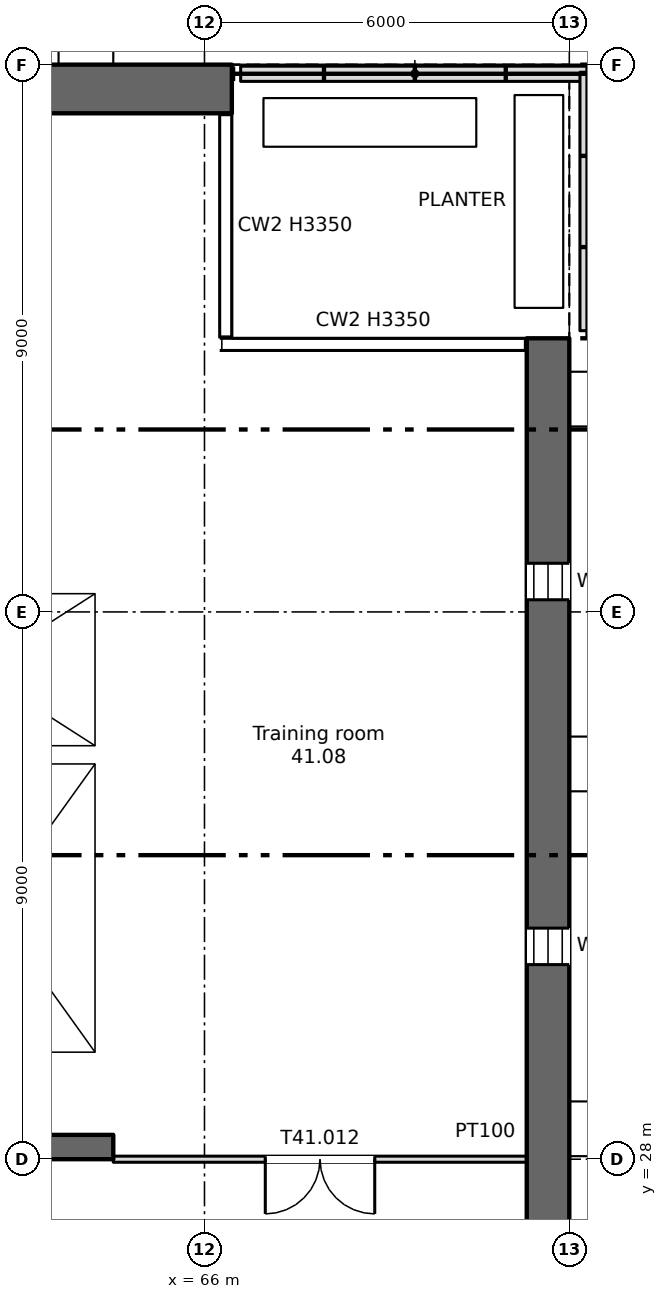
"""IFC4 building model, lengths in metres.
Left out: names, types, materials, properties, quantities, classifications, styles, units other than length and angle.
Written with IfcOpenShell. Run it as: python <this file> out.ifc"""

import sys

from ifc_helpers import new_model, si_unit, direction, frame, frame_2d, origin, place, context, subcontext, project, spatial, rectangle, extrude, element, fill, save


model = new_model("IFC4")
c1 = context("Model", 3, precision=1e-05, world=origin(), true_north=direction((0.0, 1.0)))
c2 = subcontext(c1, "Body", "Model", "MODEL_VIEW")
j1 = project(units=[si_unit("LENGTHUNIT", "METRE"), si_unit("PLANEANGLEUNIT", "RADIAN")], contexts=[c1])
p1 = place(None, origin())
s1 = spatial("IfcSite", under=j1, at=p1, CompositionType="ELEMENT")
p2 = place(p1, origin())
s2 = spatial("IfcBuilding", under=s1, at=p2, CompositionType="ELEMENT")
p3 = place(p2, frame((0.0, 0.0, 95.0)))
s3 = spatial("IfcBuildingStorey", under=s2, at=p3, CompositionType="ELEMENT", Elevation=95.0)
p4 = place(p3, frame((71.65, 6.0, 0.0), z_axis=(0.0, 0.0, 1.0), x_axis=(0.0, 1.0, 0.0)))
e1 = element("IfcWall", 1, at=p4, inside=s3, PredefinedType="SHEAR", context=c2, shape_type="SweptSolid", body=[
    extrude(rectangle(XDim=35.5, YDim=0.7, at=frame_2d((17.75, 0.0))), origin(), (0.0, 0.0, 1.0), 3.35),
])
p5 = place(p4, frame((1.2, 0.0, 0.6)))
e2 = element("IfcOpeningElement", 2, at=p5, cuts=e1, PredefinedType="OPENING", context=c2, shape_type="SweptSolid", body=[
    extrude(rectangle(XDim=0.6, YDim=2.4, at=frame_2d((0.3, 1.2))), frame((0.0, 0.36, 0.0), z_axis=(0.0, -1.0, 0.0), x_axis=(1.0, 0.0, 0.0)), (0.0, 0.0, 1.0), 0.72),
])
p6 = place(p4, frame((7.2, 0.0, 0.6)))
e3 = element("IfcOpeningElement", 3, at=p6, cuts=e1, PredefinedType="OPENING", context=c2, shape_type="SweptSolid", body=[
    extrude(rectangle(XDim=0.6, YDim=2.4, at=frame_2d((0.3, 1.2))), frame((0.0, 0.36, 0.0), z_axis=(0.0, -1.0, 0.0), x_axis=(1.0, 0.0, 0.0)), (0.0, 0.0, 1.0), 0.72),
])
p7 = place(p4, frame((19.2, 0.0, 0.6)))
e4 = element("IfcOpeningElement", 4, at=p7, cuts=e1, PredefinedType="OPENING", context=c2, shape_type="SweptSolid", body=[
    extrude(rectangle(XDim=0.6, YDim=2.4, at=frame_2d((0.3, 1.2))), frame((0.0, 0.36, 0.0), z_axis=(0.0, -1.0, 0.0), x_axis=(1.0, 0.0, 0.0)), (0.0, 0.0, 1.0), 0.72),
])
p8 = place(p4, frame((25.2, 0.0, 0.6)))
e5 = element("IfcOpeningElement", 5, at=p8, cuts=e1, PredefinedType="OPENING", context=c2, shape_type="SweptSolid", body=[
    extrude(rectangle(XDim=0.6, YDim=2.4, at=frame_2d((0.3, 1.2))), frame((0.0, 0.36, 0.0), z_axis=(0.0, -1.0, 0.0), x_axis=(1.0, 0.0, 0.0)), (0.0, 0.0, 1.0), 0.72),
])
p9 = place(p4, frame((31.2, 0.0, 0.6)))
e6 = element("IfcOpeningElement", 6, at=p9, cuts=e1, PredefinedType="OPENING", context=c2, shape_type="SweptSolid", body=[
    extrude(rectangle(XDim=0.6, YDim=2.4, at=frame_2d((0.3, 1.2))), frame((0.0, 0.36, 0.0), z_axis=(0.0, -1.0, 0.0), x_axis=(1.0, 0.0, 0.0)), (0.0, 0.0, 1.0), 0.72),
])
p10 = place(p4, frame((12.9, 0.0, 0.0)))
e7 = element("IfcOpeningElement", 7, at=p10, cuts=e1, PredefinedType="OPENING", context=c2, shape_type="SweptSolid", body=[
    extrude(rectangle(XDim=1.2, YDim=2.4, at=frame_2d((0.6, 1.2))), frame((0.0, 0.36, 0.0), z_axis=(0.0, -1.0, 0.0), x_axis=(1.0, 0.0, 0.0)), (0.0, 0.0, 1.0), 0.72),
])
p11 = place(p3, frame((5.55, 45.6, 0.0), z_axis=(0.0, 0.0, 1.0), x_axis=(1.0, 0.0, 0.0)))
e8 = element("IfcWall", 8, at=p11, inside=s3, PredefinedType="SHEAR", context=c2, shape_type="SweptSolid", body=[
    extrude(rectangle(XDim=60.9, YDim=0.8, at=frame_2d((30.45, 0.0))), origin(), (0.0, 0.0, 1.0), 3.35),
])
p12 = place(p11, frame((1.2, 0.0, 0.6)))
e9 = element("IfcOpeningElement", 9, at=p12, cuts=e8, PredefinedType="OPENING", context=c2, shape_type="SweptSolid", body=[
    extrude(rectangle(XDim=0.6, YDim=2.4, at=frame_2d((0.3, 1.2))), frame((0.0, 0.41, 0.0), z_axis=(0.0, -1.0, 0.0), x_axis=(1.0, 0.0, 0.0)), (0.0, 0.0, 1.0), 0.82),
])
p13 = place(p11, frame((7.2, 0.0, 0.6)))
e10 = element("IfcOpeningElement", 10, at=p13, cuts=e8, PredefinedType="OPENING", context=c2, shape_type="SweptSolid", body=[
    extrude(rectangle(XDim=0.6, YDim=2.4, at=frame_2d((0.3, 1.2))), frame((0.0, 0.41, 0.0), z_axis=(0.0, -1.0, 0.0), x_axis=(1.0, 0.0, 0.0)), (0.0, 0.0, 1.0), 0.82),
])
p14 = place(p11, frame((55.2, 0.0, 0.6)))
e11 = element("IfcOpeningElement", 11, at=p14, cuts=e8, PredefinedType="OPENING", context=c2, shape_type="SweptSolid", body=[
    extrude(rectangle(XDim=0.6, YDim=2.4, at=frame_2d((0.3, 1.2))), frame((0.0, 0.41, 0.0), z_axis=(0.0, -1.0, 0.0), x_axis=(1.0, 0.0, 0.0)), (0.0, 0.0, 1.0), 0.82),
])
p15 = place(p3, frame((66.595, 45.85, 0.0), z_axis=(0.0, 0.0, 1.0), x_axis=(1.0, 0.0, 0.0)))
e12 = element("IfcWall", 12, at=p15, inside=s3, PredefinedType="PARAPET", context=c2, shape_type="SweptSolid", body=[
    extrude(rectangle(XDim=5.73, YDim=0.25, at=frame_2d((2.865, 0.0))), origin(), (0.0, 0.0, 1.0), 0.3),
])
p16 = place(p3, frame((72.3, 45.875, 0.0), z_axis=(0.0, 0.0, 1.0), x_axis=(0.0, -1.0, 0.0)))
e13 = element("IfcWall", 13, at=p16, inside=s3, PredefinedType="PARAPET", context=c2, shape_type="SweptSolid", body=[
    extrude(rectangle(XDim=4.25, YDim=0.25, at=frame_2d((2.125, 0.0))), origin(), (0.0, 0.0, 1.0), 0.3),
])
p17 = place(p3, frame((6.7, 28.2, 0.0), z_axis=(0.0, 0.0, 1.0), x_axis=(1.0, 0.0, 0.0)))
e14 = element("IfcWall", 14, at=p17, inside=s3, PredefinedType="SHEAR", context=c2, shape_type="SweptSolid", body=[
    extrude(rectangle(XDim=57.8, YDim=0.4, at=frame_2d((28.9, 0.0))), origin(), (0.0, 0.0, 1.0), 3.35),
])
p18 = place(p17, frame((12.812, 0.0, 0.0)))
e15 = element("IfcOpeningElement", 15, at=p18, cuts=e14, PredefinedType="OPENING", context=c2, shape_type="SweptSolid", body=[
    extrude(rectangle(XDim=0.9, YDim=2.1, at=frame_2d((0.45, 1.05))), frame((0.0, 0.21, 0.0), z_axis=(0.0, -1.0, 0.0), x_axis=(1.0, 0.0, 0.0)), (0.0, 0.0, 1.0), 0.42),
])
p19 = place(p17, frame((15.387, 0.0, 0.0)))
e16 = element("IfcOpeningElement", 16, at=p19, cuts=e14, PredefinedType="OPENING", context=c2, shape_type="SweptSolid", body=[
    extrude(rectangle(XDim=0.9, YDim=2.1, at=frame_2d((0.45, 1.05))), frame((0.0, 0.21, 0.0), z_axis=(0.0, -1.0, 0.0), x_axis=(1.0, 0.0, 0.0)), (0.0, 0.0, 1.0), 0.42),
])
p20 = place(p17, frame((48.312, 0.0, 0.0)))
e17 = element("IfcOpeningElement", 17, at=p20, cuts=e14, PredefinedType="OPENING", context=c2, shape_type="SweptSolid", body=[
    extrude(rectangle(XDim=0.9, YDim=2.1, at=frame_2d((0.45, 1.05))), frame((0.0, 0.21, 0.0), z_axis=(0.0, -1.0, 0.0), x_axis=(1.0, 0.0, 0.0)), (0.0, 0.0, 1.0), 0.42),
])
p21 = place(p17, frame((50.887, 0.0, 0.0)))
e18 = element("IfcOpeningElement", 18, at=p21, cuts=e14, PredefinedType="OPENING", context=c2, shape_type="SweptSolid", body=[
    extrude(rectangle(XDim=0.9, YDim=2.1, at=frame_2d((0.45, 1.05))), frame((0.0, 0.21, 0.0), z_axis=(0.0, -1.0, 0.0), x_axis=(1.0, 0.0, 0.0)), (0.0, 0.0, 1.0), 0.42),
])
p22 = place(p17, frame((0.562, 0.0, 0.0)))
e19 = element("IfcOpeningElement", 19, at=p22, cuts=e14, PredefinedType="OPENING", context=c2, shape_type="SweptSolid", body=[
    extrude(rectangle(XDim=0.9, YDim=2.1, at=frame_2d((0.45, 1.05))), frame((0.0, 0.21, 0.0), z_axis=(0.0, -1.0, 0.0), x_axis=(1.0, 0.0, 0.0)), (0.0, 0.0, 1.0), 0.42),
])
p23 = place(p17, frame((2.137, 0.0, 0.0)))
e20 = element("IfcOpeningElement", 20, at=p23, cuts=e14, PredefinedType="OPENING", context=c2, shape_type="SweptSolid", body=[
    extrude(rectangle(XDim=0.9, YDim=2.1, at=frame_2d((0.45, 1.05))), frame((0.0, 0.21, 0.0), z_axis=(0.0, -1.0, 0.0), x_axis=(1.0, 0.0, 0.0)), (0.0, 0.0, 1.0), 0.42),
])
p24 = place(p17, frame((4.7, 0.0, 0.0)))
e21 = element("IfcOpeningElement", 21, at=p24, cuts=e14, PredefinedType="OPENING", context=c2, shape_type="SweptSolid", body=[
    extrude(rectangle(XDim=1.2, YDim=2.1, at=frame_2d((0.6, 1.05))), frame((0.0, 0.21, 0.0), z_axis=(0.0, -1.0, 0.0), x_axis=(1.0, 0.0, 0.0)), (0.0, 0.0, 1.0), 0.42),
])
p25 = place(p17, frame((31.7, 0.0, 0.0)))
e22 = element("IfcOpeningElement", 22, at=p25, cuts=e14, PredefinedType="OPENING", context=c2, shape_type="SweptSolid", body=[
    extrude(rectangle(XDim=1.2, YDim=2.1, at=frame_2d((0.6, 1.05))), frame((0.0, 0.21, 0.0), z_axis=(0.0, -1.0, 0.0), x_axis=(1.0, 0.0, 0.0)), (0.0, 0.0, 1.0), 0.42),
])
p26 = place(p17, frame((55.2, 0.0, 0.0)))
e23 = element("IfcOpeningElement", 23, at=p26, cuts=e14, PredefinedType="OPENING", context=c2, shape_type="SweptSolid", body=[
    extrude(rectangle(XDim=1.2, YDim=2.1, at=frame_2d((0.6, 1.05))), frame((0.0, 0.21, 0.0), z_axis=(0.0, -1.0, 0.0), x_axis=(1.0, 0.0, 0.0)), (0.0, 0.0, 1.0), 0.42),
])
p27 = place(p17, frame((21.7, 0.0, 0.0)))
e24 = element("IfcOpeningElement", 24, at=p27, cuts=e14, PredefinedType="OPENING", context=c2, shape_type="SweptSolid", body=[
    extrude(rectangle(XDim=1.2, YDim=2.1, at=frame_2d((0.6, 1.05))), frame((0.0, 0.21, 0.0), z_axis=(0.0, -1.0, 0.0), x_axis=(1.0, 0.0, 0.0)), (0.0, 0.0, 1.0), 0.42),
])
p28 = place(p17, frame((41.7, 0.0, 0.0)))
e25 = element("IfcOpeningElement", 25, at=p28, cuts=e14, PredefinedType="OPENING", context=c2, shape_type="SweptSolid", body=[
    extrude(rectangle(XDim=1.2, YDim=2.1, at=frame_2d((0.6, 1.05))), frame((0.0, 0.21, 0.0), z_axis=(0.0, -1.0, 0.0), x_axis=(1.0, 0.0, 0.0)), (0.0, 0.0, 1.0), 0.42),
])
p29 = place(p17, frame((24.85, 0.0, 0.0)))
e26 = element("IfcOpeningElement", 26, at=p29, cuts=e14, PredefinedType="OPENING", context=c2, shape_type="SweptSolid", body=[
    extrude(rectangle(XDim=2.4, YDim=2.1, at=frame_2d((1.2, 1.05))), frame((0.0, 0.21, 0.0), z_axis=(0.0, -1.0, 0.0), x_axis=(1.0, 0.0, 0.0)), (0.0, 0.0, 1.0), 0.42),
])
p30 = place(p17, frame((37.35, 0.0, 0.0)))
e27 = element("IfcOpeningElement", 27, at=p30, cuts=e14, PredefinedType="OPENING", context=c2, shape_type="SweptSolid", body=[
    extrude(rectangle(XDim=2.4, YDim=2.1, at=frame_2d((1.2, 1.05))), frame((0.0, 0.21, 0.0), z_axis=(0.0, -1.0, 0.0), x_axis=(1.0, 0.0, 0.0)), (0.0, 0.0, 1.0), 0.42),
])
p31 = place(p17, frame((7.95, 0.0, 0.0)))
e28 = element("IfcOpeningElement", 28, at=p31, cuts=e14, PredefinedType="OPENING", context=c2, shape_type="SweptSolid", body=[
    extrude(rectangle(XDim=2.4, YDim=2.1, at=frame_2d((1.2, 1.05))), frame((0.0, 0.21, 0.0), z_axis=(0.0, -1.0, 0.0), x_axis=(1.0, 0.0, 0.0)), (0.0, 0.0, 1.0), 0.42),
])
p32 = place(p17, frame((28.85, 0.0, 0.0)))
e29 = element("IfcOpeningElement", 29, at=p32, cuts=e14, PredefinedType="OPENING", context=c2, shape_type="SweptSolid", body=[
    extrude(rectangle(XDim=0.9, YDim=2.1, at=frame_2d((0.45, 1.05))), frame((0.0, 0.21, 0.0), z_axis=(0.0, -1.0, 0.0), x_axis=(1.0, 0.0, 0.0)), (0.0, 0.0, 1.0), 0.42),
])
p33 = place(p17, frame((34.85, 0.0, 0.0)))
e30 = element("IfcOpeningElement", 30, at=p33, cuts=e14, PredefinedType="OPENING", context=c2, shape_type="SweptSolid", body=[
    extrude(rectangle(XDim=0.9, YDim=2.1, at=frame_2d((0.45, 1.05))), frame((0.0, 0.21, 0.0), z_axis=(0.0, -1.0, 0.0), x_axis=(1.0, 0.0, 0.0)), (0.0, 0.0, 1.0), 0.42),
])
p34 = place(p3, frame((64.35, 34.8, 0.0), z_axis=(0.0, 0.0, 1.0), x_axis=(0.0, 1.0, 0.0)))
e31 = element("IfcWall", 31, at=p34, inside=s3, PredefinedType="SHEAR", context=c2, shape_type="SweptSolid", body=[
    extrude(rectangle(XDim=10.4, YDim=0.3, at=frame_2d((5.2, 0.0))), origin(), (0.0, 0.0, 1.0), 3.35),
])
p35 = place(p3, frame((64.35, 28.4, 0.0), z_axis=(0.0, 0.0, 1.0), x_axis=(0.0, 1.0, 0.0)))
e32 = element("IfcWall", 32, at=p35, inside=s3, PredefinedType="SHEAR", context=c2, shape_type="SweptSolid", body=[
    extrude(rectangle(XDim=6.1, YDim=0.3, at=frame_2d((3.05, 0.0))), origin(), (0.0, 0.0, 1.0), 3.35),
])
p36 = place(p3, frame((60.3, 34.65, 0.0), z_axis=(0.0, 0.0, 1.0), x_axis=(1.0, 0.0, 0.0)))
e33 = element("IfcWall", 33, at=p36, inside=s3, PredefinedType="SHEAR", context=c2, shape_type="SweptSolid", body=[
    extrude(rectangle(XDim=4.2, YDim=0.3, at=frame_2d((2.1, 0.0))), origin(), (0.0, 0.0, 1.0), 3.35),
])
p37 = place(p3, frame((60.3, 37.45, 0.0), z_axis=(0.0, 0.0, 1.0), x_axis=(1.0, 0.0, 0.0)))
e34 = element("IfcWall", 34, at=p37, inside=s3, PredefinedType="SHEAR", context=c2, shape_type="SweptSolid", body=[
    extrude(rectangle(XDim=3.9, YDim=0.3, at=frame_2d((1.95, 0.0))), origin(), (0.0, 0.0, 1.0), 3.35),
])
p38 = place(p37, frame((1.4, 0.0, 0.0)))
e35 = element("IfcOpeningElement", 35, at=p38, cuts=e34, PredefinedType="OPENING", context=c2, shape_type="SweptSolid", body=[
    extrude(rectangle(XDim=1.1, YDim=2.1, at=frame_2d((0.55, 1.05))), frame((0.0, 0.16, 0.0), z_axis=(0.0, -1.0, 0.0), x_axis=(1.0, 0.0, 0.0)), (0.0, 0.0, 1.0), 0.32),
])
p39 = place(p3, frame((64.5, 28.0, 0.0), z_axis=(0.0, 0.0, 1.0), x_axis=(1.0, 0.0, 0.0)))
e36 = element("IfcWall", 36, at=p39, inside=s3, PredefinedType="PARTITIONING", context=c2, shape_type="SweptSolid", body=[
    extrude(rectangle(XDim=6.8, YDim=0.1, at=frame_2d((3.4, 0.0))), origin(), (0.0, 0.0, 1.0), 3.35),
])
p40 = place(p39, frame((2.5, 0.0, 0.0)))
e37 = element("IfcOpeningElement", 37, at=p40, cuts=e36, PredefinedType="OPENING", context=c2, shape_type="SweptSolid", body=[
    extrude(rectangle(XDim=1.8, YDim=2.1, at=frame_2d((0.9, 1.05))), frame((0.0, 0.06, 0.0), z_axis=(0.0, -1.0, 0.0), x_axis=(1.0, 0.0, 0.0)), (0.0, 0.0, 1.0), 0.12),
])
p41 = place(p8, origin())
e38 = element("IfcWindow", 38, at=p41, inside=s3, PartitioningType="SINGLE_PANEL", PredefinedType="WINDOW", context=c2, shape_type="SweptSolid", body=[
    extrude(rectangle(XDim=0.6, YDim=2.4, at=frame_2d((0.3, 1.2))), frame((0.0, 0.03, 0.0), z_axis=(0.0, -1.0, 0.0), x_axis=(1.0, 0.0, 0.0)), (0.0, 0.0, 1.0), 0.06),
])
fill(e5, e38)
p42 = place(p9, origin())
e39 = element("IfcWindow", 39, at=p42, inside=s3, PartitioningType="SINGLE_PANEL", PredefinedType="WINDOW", context=c2, shape_type="SweptSolid", body=[
    extrude(rectangle(XDim=0.6, YDim=2.4, at=frame_2d((0.3, 1.2))), frame((0.0, 0.03, 0.0), z_axis=(0.0, -1.0, 0.0), x_axis=(1.0, 0.0, 0.0)), (0.0, 0.0, 1.0), 0.06),
])
fill(e6, e39)
p43 = place(p40, origin())
e40 = element("IfcDoor", 40, at=p43, inside=s3, OperationType="DOUBLE_DOOR_SINGLE_SWING", PredefinedType="DOOR", context=c2, shape_type="SweptSolid", body=[
    extrude(rectangle(XDim=1.8, YDim=2.1, at=frame_2d((0.9, 1.05))), frame((0.0, 0.025, 0.0), z_axis=(0.0, -1.0, 0.0), x_axis=(1.0, 0.0, 0.0)), (0.0, 0.0, 1.0), 0.05),
])
fill(e37, e40)
save(model, sys.argv[1])
